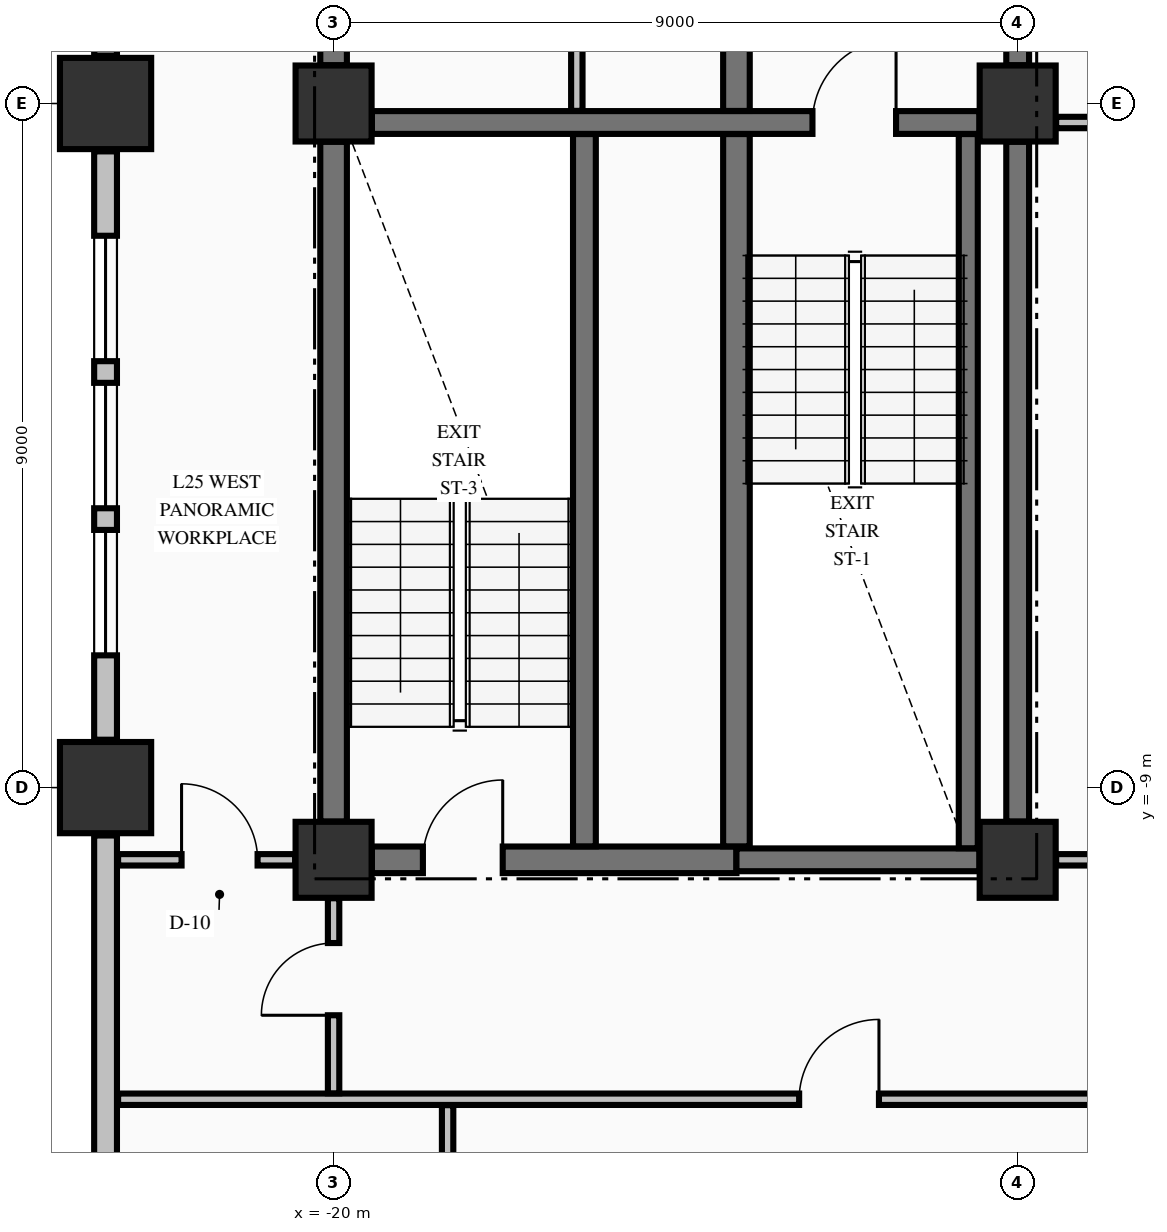
"""IFC4 building model, lengths in metres.
Left out: names, types, materials, properties, quantities, classifications, styles, units other than length and angle.
Written with IfcOpenShell. Run it as: python <this file> out.ifc"""

import sys

from ifc_helpers import new_model, si_unit, direction, frame, frame_2d, origin, origin_2d, place, context, subcontext, project, spatial, rectangle, extrude, element, fill, save


model = new_model("IFC4")
c1 = context("Model", 3, precision=1e-05, world=origin(), true_north=direction((0.0, 1.0)))
c2 = subcontext(c1, "Body", "Model", "MODEL_VIEW")
j1 = project(units=[si_unit("LENGTHUNIT", "METRE"), si_unit("PLANEANGLEUNIT", "RADIAN")], contexts=[c1])
p1 = place(None, origin())
s1 = spatial("IfcSite", under=j1, at=p1, CompositionType="ELEMENT")
p2 = place(p1, origin())
s2 = spatial("IfcBuilding", under=s1, at=p2, CompositionType="ELEMENT")
p3 = place(p2, frame((0.0, 0.0, 102.07)))
s3 = spatial("IfcBuildingStorey", under=s2, at=p3, CompositionType="ELEMENT", Elevation=102.07)
for number, where, z_axis, x_axis in (
    (1, (-23.0, -9.0, -0.25), (0.0, 0.0, 1.0), (1.0, 0.0, 0.0)),
    (2, (-23.0, 0.0, -0.25), (0.0, 0.0, 1.0), (1.0, 0.0, 0.0)),
):
    element("IfcColumn", number, at=place(p3, frame(where, z_axis=z_axis, x_axis=x_axis)), inside=s3, PredefinedType="COLUMN", context=c2, shape_type="SweptSolid", body=[
        extrude(rectangle(XDim=1.2, YDim=1.2, at=origin_2d()), origin(), (0.0, 0.0, 1.0), 3.57),
    ])
for number, where, z_axis, x_axis in (
    (3, (-20.0, -9.95, -0.25), (0.0, 0.0, 1.0), (1.0, 0.0, 0.0)),
    (4, (-11.0, -9.95, -0.25), (0.0, 0.0, 1.0), (1.0, 0.0, 0.0)),
    (5, (-11.0, 0.0, -0.25), (0.0, 0.0, 1.0), (1.0, 0.0, 0.0)),
    (6, (-20.0, 0.0, -0.25), (0.0, 0.0, 1.0), (1.0, 0.0, 0.0)),
):
    element("IfcColumn", number, at=place(p3, frame(where, z_axis=z_axis, x_axis=x_axis)), inside=s3, PredefinedType="COLUMN", context=c2, shape_type="SweptSolid", body=[
        extrude(rectangle(XDim=1.0, YDim=1.0, at=origin_2d()), origin(), (0.0, 0.0, 1.0), 3.57),
    ])
p4 = place(p3, frame((-23.0, -9.63, 0.0), z_axis=(0.0, 0.0, 1.0), x_axis=(0.0, -1.0, 0.0)))
e7 = element("IfcWall", 7, at=p4, inside=s3, PredefinedType="STANDARD", context=c2, shape_type="SweptSolid", body=[
    extrude(rectangle(XDim=10.74, YDim=0.3, at=frame_2d((5.37, 0.0))), origin(), (0.0, 0.0, 1.0), 2.712),
])
p5 = place(p3, frame((-23.0, -0.63, 0.0), z_axis=(0.0, 0.0, 1.0), x_axis=(0.0, -1.0, 0.0)))
e8 = element("IfcWall", 8, at=p5, inside=s3, PredefinedType="STANDARD", context=c2, shape_type="SweptSolid", body=[
    extrude(rectangle(XDim=7.74, YDim=0.3, at=frame_2d((3.87, 0.0))), origin(), (0.0, 0.0, 1.0), 2.712),
])
p6 = place(p5, frame((1.11, 0.0, 0.8)))
e9 = element("IfcOpeningElement", 9, at=p6, cuts=e8, PredefinedType="OPENING", context=c2, shape_type="SweptSolid", body=[
    extrude(rectangle(XDim=1.65, YDim=1.7, at=frame_2d((0.825, 0.85))), frame((0.0, 0.16, 0.0), z_axis=(0.0, -1.0, 0.0), x_axis=(1.0, 0.0, 0.0)), (0.0, 0.0, 1.0), 0.32),
])
p7 = place(p5, frame((3.045, 0.0, 0.8)))
e10 = element("IfcOpeningElement", 10, at=p7, cuts=e8, PredefinedType="OPENING", context=c2, shape_type="SweptSolid", body=[
    extrude(rectangle(XDim=1.65, YDim=1.7, at=frame_2d((0.825, 0.85))), frame((0.0, 0.16, 0.0), z_axis=(0.0, -1.0, 0.0), x_axis=(1.0, 0.0, 0.0)), (0.0, 0.0, 1.0), 0.32),
])
p8 = place(p5, frame((4.98, 0.0, 0.8)))
e11 = element("IfcOpeningElement", 11, at=p8, cuts=e8, PredefinedType="OPENING", context=c2, shape_type="SweptSolid", body=[
    extrude(rectangle(XDim=1.65, YDim=1.7, at=frame_2d((0.825, 0.85))), frame((0.0, 0.16, 0.0), z_axis=(0.0, -1.0, 0.0), x_axis=(1.0, 0.0, 0.0)), (0.0, 0.0, 1.0), 0.32),
])
p9 = place(p3, frame((-23.0, 8.37, 0.0), z_axis=(0.0, 0.0, 1.0), x_axis=(0.0, -1.0, 0.0)))
e12 = element("IfcWall", 12, at=p9, inside=s3, PredefinedType="STANDARD", context=c2, shape_type="SweptSolid", body=[
    extrude(rectangle(XDim=7.74, YDim=0.3, at=frame_2d((3.87, 0.0))), origin(), (0.0, 0.0, 1.0), 2.712),
])
p10 = place(p9, frame((1.11, 0.0, 0.8)))
e13 = element("IfcOpeningElement", 13, at=p10, cuts=e12, PredefinedType="OPENING", context=c2, shape_type="SweptSolid", body=[
    extrude(rectangle(XDim=1.65, YDim=1.7, at=frame_2d((0.825, 0.85))), frame((0.0, 0.16, 0.0), z_axis=(0.0, -1.0, 0.0), x_axis=(1.0, 0.0, 0.0)), (0.0, 0.0, 1.0), 0.32),
])
p11 = place(p9, frame((3.045, 0.0, 0.8)))
e14 = element("IfcOpeningElement", 14, at=p11, cuts=e12, PredefinedType="OPENING", context=c2, shape_type="SweptSolid", body=[
    extrude(rectangle(XDim=1.65, YDim=1.7, at=frame_2d((0.825, 0.85))), frame((0.0, 0.16, 0.0), z_axis=(0.0, -1.0, 0.0), x_axis=(1.0, 0.0, 0.0)), (0.0, 0.0, 1.0), 0.32),
])
p12 = place(p9, frame((4.98, 0.0, 0.8)))
e15 = element("IfcOpeningElement", 15, at=p12, cuts=e12, PredefinedType="OPENING", context=c2, shape_type="SweptSolid", body=[
    extrude(rectangle(XDim=1.65, YDim=1.7, at=frame_2d((0.825, 0.85))), frame((0.0, 0.16, 0.0), z_axis=(0.0, -1.0, 0.0), x_axis=(1.0, 0.0, 0.0)), (0.0, 0.0, 1.0), 0.32),
])
p13 = place(p3, frame((-19.496, -9.95, 0.0), z_axis=(0.0, 0.0, 1.0), x_axis=(1.0, 0.0, 0.0)))
e16 = element("IfcWall", 16, at=p13, inside=s3, PredefinedType="SHEAR", context=c2, shape_type="SweptSolid", body=[
    extrude(rectangle(XDim=4.796, YDim=0.35, at=frame_2d((2.398, 0.0))), origin(), (0.0, 0.0, 1.0), 3.32),
])
p14 = place(p13, frame((0.671, 0.0, 0.0)))
e17 = element("IfcOpeningElement", 17, at=p14, cuts=e16, PredefinedType="OPENING", context=c2, shape_type="SweptSolid", body=[
    extrude(rectangle(XDim=1.05, YDim=2.15, at=frame_2d((0.525, 1.075))), frame((0.0, 0.185, 0.0), z_axis=(0.0, -1.0, 0.0), x_axis=(1.0, 0.0, 0.0)), (0.0, 0.0, 1.0), 0.37),
])
p15 = place(p3, frame((-14.7, -9.95, 0.0), z_axis=(0.0, 0.0, 1.0), x_axis=(1.0, 0.0, 0.0)))
e18 = element("IfcWall", 18, at=p15, inside=s3, PredefinedType="SHEAR", context=c2, shape_type="SweptSolid", body=[
    extrude(rectangle(XDim=3.196, YDim=0.3, at=frame_2d((1.598, 0.0))), origin(), (0.0, 0.0, 1.0), 3.32),
])
p16 = place(p3, frame((-19.496, -0.25, 0.0), z_axis=(0.0, 0.0, 1.0), x_axis=(1.0, 0.0, 0.0)))
e19 = element("IfcWall", 19, at=p16, inside=s3, PredefinedType="SHEAR", context=c2, shape_type="SweptSolid", body=[
    extrude(rectangle(XDim=7.992, YDim=0.3, at=frame_2d((3.996, 0.0))), origin(), (0.0, 0.0, 1.0), 3.32),
])
p17 = place(p16, frame((5.796, 0.0, 0.0)))
e20 = element("IfcOpeningElement", 20, at=p17, cuts=e19, PredefinedType="OPENING", context=c2, shape_type="SweptSolid", body=[
    extrude(rectangle(XDim=1.1, YDim=2.15, at=frame_2d((0.55, 1.075))), frame((0.0, 0.16, 0.0), z_axis=(0.0, -1.0, 0.0), x_axis=(1.0, 0.0, 0.0)), (0.0, 0.0, 1.0), 0.32),
])
p18 = place(p3, frame((-22.835, -13.1, 0.0), z_axis=(0.0, 0.0, 1.0), x_axis=(1.0, 0.0, 0.0)))
e21 = element("IfcWall", 21, at=p18, inside=s3, PredefinedType="PARTITIONING", context=c2, shape_type="SweptSolid", body=[
    extrude(rectangle(XDim=50.67, YDim=0.15, at=frame_2d((25.335, 0.0))), origin(), (0.0, 0.0, 1.0), 3.32),
])
p19 = place(p18, frame((8.96, 0.0, 0.0)))
e22 = element("IfcOpeningElement", 22, at=p19, cuts=e21, PredefinedType="OPENING", context=c2, shape_type="SweptSolid", body=[
    extrude(rectangle(XDim=1.05, YDim=2.15, at=frame_2d((0.525, 1.075))), frame((0.0, 0.085, 0.0), z_axis=(0.0, -1.0, 0.0), x_axis=(1.0, 0.0, 0.0)), (0.0, 0.0, 1.0), 0.17),
])
p20 = place(p18, frame((20.61, 0.0, 0.0)))
e23 = element("IfcOpeningElement", 23, at=p20, cuts=e21, PredefinedType="OPENING", context=c2, shape_type="SweptSolid", body=[
    extrude(rectangle(XDim=1.05, YDim=2.15, at=frame_2d((0.525, 1.075))), frame((0.0, 0.085, 0.0), z_axis=(0.0, -1.0, 0.0), x_axis=(1.0, 0.0, 0.0)), (0.0, 0.0, 1.0), 0.17),
])
p21 = place(p18, frame((28.76, 0.0, 0.0)))
e24 = element("IfcOpeningElement", 24, at=p21, cuts=e21, PredefinedType="OPENING", context=c2, shape_type="SweptSolid", body=[
    extrude(rectangle(XDim=1.05, YDim=2.15, at=frame_2d((0.525, 1.075))), frame((0.0, 0.085, 0.0), z_axis=(0.0, -1.0, 0.0), x_axis=(1.0, 0.0, 0.0)), (0.0, 0.0, 1.0), 0.17),
])
p22 = place(p3, frame((-22.835, -9.95, 0.0), z_axis=(0.0, 0.0, 1.0), x_axis=(1.0, 0.0, 0.0)))
e25 = element("IfcWall", 25, at=p22, inside=s3, PredefinedType="PARTITIONING", context=c2, shape_type="SweptSolid", body=[
    extrude(rectangle(XDim=2.329, YDim=0.15, at=frame_2d((1.165, 0.0))), origin(), (0.0, 0.0, 1.0), 3.32),
])
p23 = place(p22, frame((0.835, 0.0, 0.0)))
e26 = element("IfcOpeningElement", 26, at=p23, cuts=e25, PredefinedType="OPENING", context=c2, shape_type="SweptSolid", body=[
    extrude(rectangle(XDim=1.0, YDim=2.15, at=frame_2d((0.5, 1.075))), frame((0.0, 0.085, 0.0), z_axis=(0.0, -1.0, 0.0), x_axis=(1.0, 0.0, 0.0)), (0.0, 0.0, 1.0), 0.17),
])
p24 = place(p3, frame((-10.494, -9.95, 0.0), z_axis=(0.0, 0.0, 1.0), x_axis=(1.0, 0.0, 0.0)))
e27 = element("IfcWall", 27, at=p24, inside=s3, PredefinedType="PARTITIONING", context=c2, shape_type="SweptSolid", body=[
    extrude(rectangle(XDim=20.988, YDim=0.15, at=frame_2d((10.494, 0.0))), origin(), (0.0, 0.0, 1.0), 3.32),
])
p25 = place(p24, frame((12.594, 0.0, 0.0)))
e28 = element("IfcOpeningElement", 28, at=p25, cuts=e27, PredefinedType="OPENING", context=c2, shape_type="SweptSolid", body=[
    extrude(rectangle(XDim=1.1, YDim=2.15, at=frame_2d((0.55, 1.075))), frame((0.0, 0.085, 0.0), z_axis=(0.0, -1.0, 0.0), x_axis=(1.0, 0.0, 0.0)), (0.0, 0.0, 1.0), 0.17),
])
p26 = place(p24, frame((18.799, 0.0, 0.0)))
e29 = element("IfcOpeningElement", 29, at=p26, cuts=e27, PredefinedType="OPENING", context=c2, shape_type="SweptSolid", body=[
    extrude(rectangle(XDim=0.95, YDim=2.15, at=frame_2d((0.475, 1.075))), frame((0.0, 0.085, 0.0), z_axis=(0.0, -1.0, 0.0), x_axis=(1.0, 0.0, 0.0)), (0.0, 0.0, 1.0), 0.17),
])
p27 = place(p3, frame((-10.494, -0.25, 0.0), z_axis=(0.0, 0.0, 1.0), x_axis=(1.0, 0.0, 0.0)))
e30 = element("IfcWall", 30, at=p27, inside=s3, PredefinedType="PARTITIONING", context=c2, shape_type="SweptSolid", body=[
    extrude(rectangle(XDim=20.988, YDim=0.15, at=frame_2d((10.494, 0.0))), origin(), (0.0, 0.0, 1.0), 3.32),
])
p28 = place(p27, frame((12.594, 0.0, 0.0)))
e31 = element("IfcOpeningElement", 31, at=p28, cuts=e30, PredefinedType="OPENING", context=c2, shape_type="SweptSolid", body=[
    extrude(rectangle(XDim=1.1, YDim=2.15, at=frame_2d((0.55, 1.075))), frame((0.0, 0.085, 0.0), z_axis=(0.0, -1.0, 0.0), x_axis=(1.0, 0.0, 0.0)), (0.0, 0.0, 1.0), 0.17),
])
p29 = place(p27, frame((5.249, 0.0, 0.0)))
e32 = element("IfcOpeningElement", 32, at=p29, cuts=e30, PredefinedType="OPENING", context=c2, shape_type="SweptSolid", body=[
    extrude(rectangle(XDim=1.05, YDim=2.15, at=frame_2d((0.525, 1.075))), frame((0.0, 0.085, 0.0), z_axis=(0.0, -1.0, 0.0), x_axis=(1.0, 0.0, 0.0)), (0.0, 0.0, 1.0), 0.17),
])
p30 = place(p27, frame((17.399, 0.0, 0.0)))
e33 = element("IfcOpeningElement", 33, at=p30, cuts=e30, PredefinedType="OPENING", context=c2, shape_type="SweptSolid", body=[
    extrude(rectangle(XDim=0.95, YDim=2.15, at=frame_2d((0.475, 1.075))), frame((0.0, 0.085, 0.0), z_axis=(0.0, -1.0, 0.0), x_axis=(1.0, 0.0, 0.0)), (0.0, 0.0, 1.0), 0.17),
])
p31 = place(p3, frame((-20.0, -9.446, 0.0), z_axis=(0.0, 0.0, 1.0), x_axis=(0.0, 1.0, 0.0)))
e34 = element("IfcWall", 34, at=p31, inside=s3, PredefinedType="SHEAR", context=c2, shape_type="SweptSolid", body=[
    extrude(rectangle(XDim=8.942, YDim=0.35, at=frame_2d((4.471, 0.0))), origin(), (0.0, 0.0, 1.0), 3.32),
])
p32 = place(p3, frame((-20.0, 0.504, 0.0), z_axis=(0.0, 0.0, 1.0), x_axis=(0.0, 1.0, 0.0)))
e35 = element("IfcWall", 35, at=p32, inside=s3, PredefinedType="SHEAR", context=c2, shape_type="SweptSolid", body=[
    extrude(rectangle(XDim=9.492, YDim=0.35, at=frame_2d((4.746, 0.0))), origin(), (0.0, 0.0, 1.0), 3.32),
])
p33 = place(p3, frame((-16.7, -9.773, 0.0), z_axis=(0.0, 0.0, 1.0), x_axis=(0.0, 1.0, 0.0)))
e36 = element("IfcWall", 36, at=p33, inside=s3, PredefinedType="SHEAR", context=c2, shape_type="SweptSolid", body=[
    extrude(rectangle(XDim=9.371, YDim=0.3, at=frame_2d((4.686, 0.0))), origin(), (0.0, 0.0, 1.0), 3.32),
])
p34 = place(p3, frame((-14.7, -9.773, 0.0), z_axis=(0.0, 0.0, 1.0), x_axis=(0.0, 1.0, 0.0)))
e37 = element("IfcWall", 37, at=p34, inside=s3, PredefinedType="SHEAR", context=c2, shape_type="SweptSolid", body=[
    extrude(rectangle(XDim=9.371, YDim=0.35, at=frame_2d((4.686, 0.0))), origin(), (0.0, 0.0, 1.0), 3.32),
])
p35 = place(p3, frame((-14.7, -0.098, 0.0), z_axis=(0.0, 0.0, 1.0), x_axis=(0.0, 1.0, 0.0)))
e38 = element("IfcWall", 38, at=p35, inside=s3, PredefinedType="SHEAR", context=c2, shape_type="SweptSolid", body=[
    extrude(rectangle(XDim=2.846, YDim=0.35, at=frame_2d((1.423, 0.0))), origin(), (0.0, 0.0, 1.0), 3.32),
])
p36 = place(p3, frame((-11.65, -9.798, 0.0), z_axis=(0.0, 0.0, 1.0), x_axis=(0.0, 1.0, 0.0)))
e39 = element("IfcWall", 39, at=p36, inside=s3, PredefinedType="SOLIDWALL", context=c2, shape_type="SweptSolid", body=[
    extrude(rectangle(XDim=9.396, YDim=0.25, at=frame_2d((4.698, 0.0))), origin(), (0.0, 0.0, 1.0), 3.32),
])
p37 = place(p3, frame((-11.0, -9.446, 0.0), z_axis=(0.0, 0.0, 1.0), x_axis=(0.0, 1.0, 0.0)))
e40 = element("IfcWall", 40, at=p37, inside=s3, PredefinedType="SHEAR", context=c2, shape_type="SweptSolid", body=[
    extrude(rectangle(XDim=8.942, YDim=0.3, at=frame_2d((4.471, 0.0))), origin(), (0.0, 0.0, 1.0), 3.32),
])
p38 = place(p3, frame((-11.0, 0.504, 0.0), z_axis=(0.0, 0.0, 1.0), x_axis=(0.0, 1.0, 0.0)))
e41 = element("IfcWall", 41, at=p38, inside=s3, PredefinedType="SHEAR", context=c2, shape_type="SweptSolid", body=[
    extrude(rectangle(XDim=2.244, YDim=0.3, at=frame_2d((1.122, 0.0))), origin(), (0.0, 0.0, 1.0), 3.32),
])
p39 = place(p38, frame((0.596, 0.0, 0.0)))
e42 = element("IfcOpeningElement", 42, at=p39, cuts=e41, PredefinedType="OPENING", context=c2, shape_type="SweptSolid", body=[
    extrude(rectangle(XDim=1.1, YDim=2.15, at=frame_2d((0.55, 1.075))), frame((0.0, 0.16, 0.0), z_axis=(0.0, -1.0, 0.0), x_axis=(1.0, 0.0, 0.0)), (0.0, 0.0, 1.0), 0.32),
])
p40 = place(p3, frame((-20.0, -13.022, 0.0), z_axis=(0.0, 0.0, 1.0), x_axis=(0.0, 1.0, 0.0)))
e43 = element("IfcWall", 43, at=p40, inside=s3, PredefinedType="PARTITIONING", context=c2, shape_type="SweptSolid", body=[
    extrude(rectangle(XDim=2.566, YDim=0.15, at=frame_2d((1.283, 0.0))), origin(), (0.0, 0.0, 1.0), 2.81),
])
p41 = place(p40, frame((1.027, 0.0, 0.0)))
e44 = element("IfcOpeningElement", 44, at=p41, cuts=e43, PredefinedType="OPENING", context=c2, shape_type="SweptSolid", body=[
    extrude(rectangle(XDim=0.95, YDim=2.15, at=frame_2d((0.475, 1.075))), frame((0.0, 0.085, 0.0), z_axis=(0.0, -1.0, 0.0), x_axis=(1.0, 0.0, 0.0)), (0.0, 0.0, 1.0), 0.17),
])
p42 = place(p3, frame((-18.5, -20.394, 0.0), z_axis=(0.0, 0.0, 1.0), x_axis=(0.0, 1.0, 0.0)))
e45 = element("IfcWall", 45, at=p42, inside=s3, PredefinedType="PARTITIONING", context=c2, shape_type="SweptSolid", body=[
    extrude(rectangle(XDim=7.216, YDim=0.15, at=frame_2d((3.608, 0.0))), origin(), (0.0, 0.0, 1.0), 3.32),
])
p43 = place(p3, frame((-16.8, -0.097, 0.0), z_axis=(0.0, 0.0, 1.0), x_axis=(0.0, 1.0, 0.0)))
e46 = element("IfcWall", 46, at=p43, inside=s3, PredefinedType="PARTITIONING", context=c2, shape_type="SweptSolid", body=[
    extrude(rectangle(XDim=4.819, YDim=0.15, at=frame_2d((2.409, 0.0))), origin(), (0.0, 0.0, 1.0), 3.32),
])
p44 = place(p6, origin())
e47 = element("IfcWindow", 47, at=p44, inside=s3, PartitioningType="SINGLE_PANEL", PredefinedType="WINDOW", context=c2, shape_type="SweptSolid", body=[
    extrude(rectangle(XDim=1.65, YDim=1.7, at=frame_2d((0.825, 0.85))), frame((0.0, 0.03, 0.0), z_axis=(0.0, -1.0, 0.0), x_axis=(1.0, 0.0, 0.0)), (0.0, 0.0, 1.0), 0.06),
])
fill(e9, e47)
p45 = place(p7, origin())
e48 = element("IfcWindow", 48, at=p45, inside=s3, PartitioningType="SINGLE_PANEL", PredefinedType="WINDOW", context=c2, shape_type="SweptSolid", body=[
    extrude(rectangle(XDim=1.65, YDim=1.7, at=frame_2d((0.825, 0.85))), frame((0.0, 0.03, 0.0), z_axis=(0.0, -1.0, 0.0), x_axis=(1.0, 0.0, 0.0)), (0.0, 0.0, 1.0), 0.06),
])
fill(e10, e48)
p46 = place(p8, origin())
e49 = element("IfcWindow", 49, at=p46, inside=s3, PartitioningType="SINGLE_PANEL", PredefinedType="WINDOW", context=c2, shape_type="SweptSolid", body=[
    extrude(rectangle(XDim=1.65, YDim=1.7, at=frame_2d((0.825, 0.85))), frame((0.0, 0.03, 0.0), z_axis=(0.0, -1.0, 0.0), x_axis=(1.0, 0.0, 0.0)), (0.0, 0.0, 1.0), 0.06),
])
fill(e11, e49)
p47 = place(p17, origin())
e50 = element("IfcDoor", 50, at=p47, inside=s3, OperationType="SINGLE_SWING_RIGHT", PredefinedType="DOOR", context=c2, shape_type="SweptSolid", body=[
    extrude(rectangle(XDim=1.1, YDim=2.15, at=frame_2d((0.55, 1.075))), frame((0.0, 0.025, 0.0), z_axis=(0.0, -1.0, 0.0), x_axis=(1.0, 0.0, 0.0)), (0.0, 0.0, 1.0), 0.05),
])
fill(e20, e50)
p48 = place(p14, origin())
e51 = element("IfcDoor", 51, at=p48, inside=s3, OperationType="SINGLE_SWING_RIGHT", PredefinedType="DOOR", context=c2, shape_type="SweptSolid", body=[
    extrude(rectangle(XDim=1.05, YDim=2.15, at=frame_2d((0.525, 1.075))), frame((0.0, 0.025, 0.0), z_axis=(0.0, -1.0, 0.0), x_axis=(1.0, 0.0, 0.0)), (0.0, 0.0, 1.0), 0.05),
])
fill(e17, e51)
p49 = place(p19, origin())
e52 = element("IfcDoor", 52, at=p49, inside=s3, OperationType="SINGLE_SWING_RIGHT", PredefinedType="DOOR", context=c2, shape_type="SweptSolid", body=[
    extrude(rectangle(XDim=1.05, YDim=2.15, at=frame_2d((0.525, 1.075))), frame((0.0, 0.025, 0.0), z_axis=(0.0, -1.0, 0.0), x_axis=(1.0, 0.0, 0.0)), (0.0, 0.0, 1.0), 0.05),
])
fill(e22, e52)
p50 = place(p41, origin())
e53 = element("IfcDoor", 53, at=p50, inside=s3, OperationType="SINGLE_SWING_LEFT", PredefinedType="DOOR", context=c2, shape_type="SweptSolid", body=[
    extrude(rectangle(XDim=0.95, YDim=2.15, at=frame_2d((0.475, 1.075))), frame((0.0, 0.025, 0.0), z_axis=(0.0, -1.0, 0.0), x_axis=(1.0, 0.0, 0.0)), (0.0, 0.0, 1.0), 0.05),
])
fill(e44, e53)
p51 = place(p23, origin())
e54 = element("IfcDoor", 54, at=p51, inside=s3, OperationType="SINGLE_SWING_LEFT", PredefinedType="DOOR", context=c2, shape_type="SweptSolid", body=[
    extrude(rectangle(XDim=1.0, YDim=2.15, at=frame_2d((0.5, 1.075))), frame((0.0, 0.025, 0.0), z_axis=(0.0, -1.0, 0.0), x_axis=(1.0, 0.0, 0.0)), (0.0, 0.0, 1.0), 0.05),
])
fill(e26, e54)
save(model, sys.argv[1])
